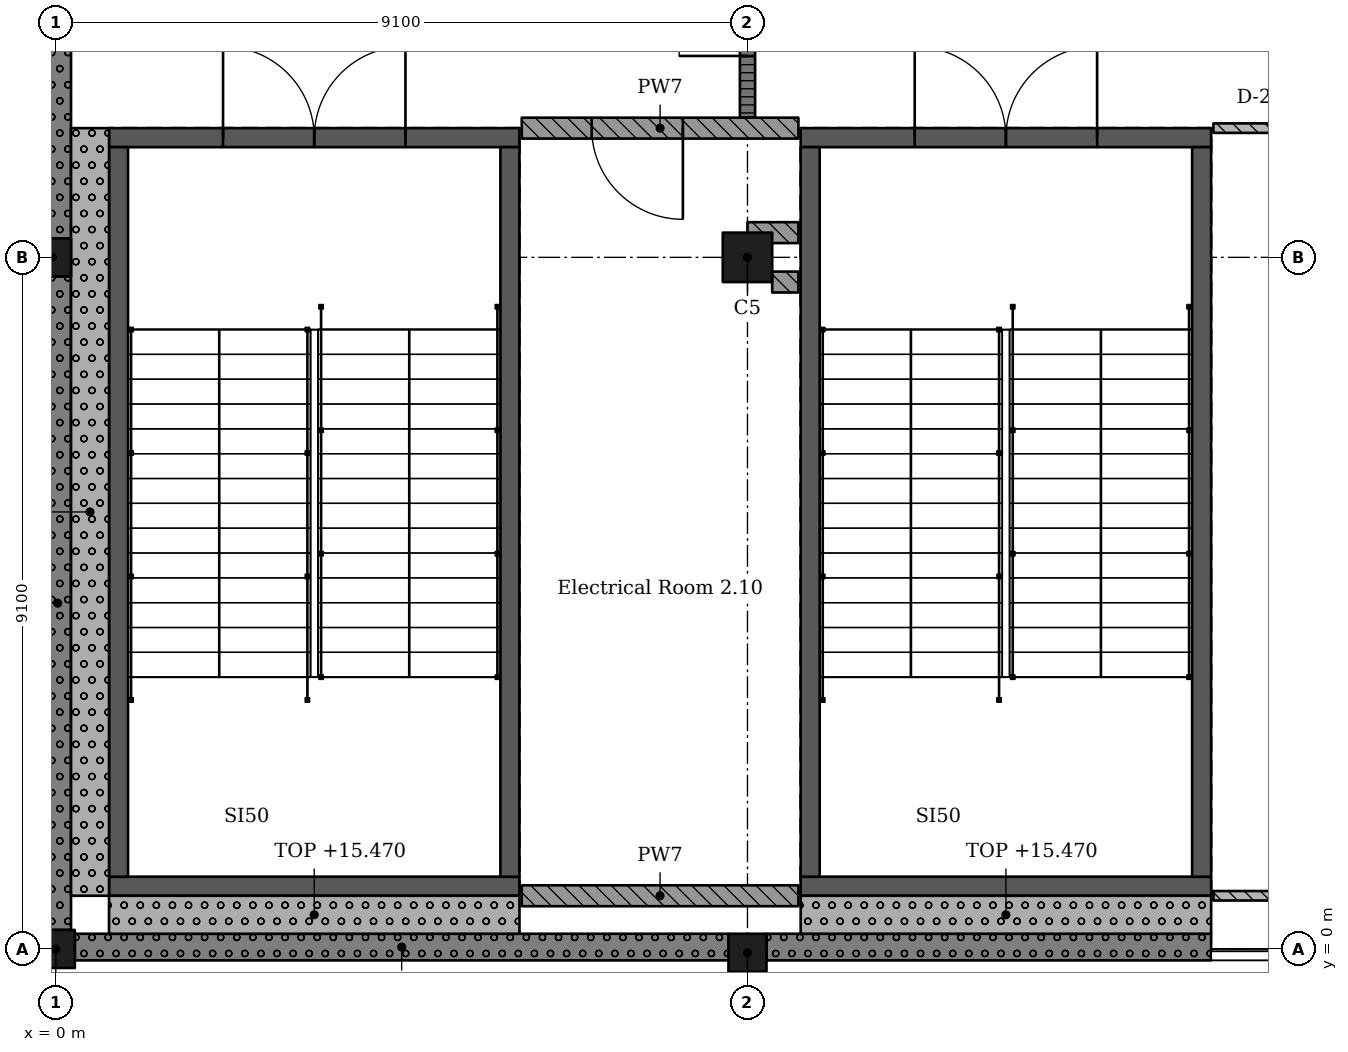
"""IFC4 building model, lengths in metres.
Left out: names, types, materials, properties, quantities, classifications, styles, units other than length and angle.
Written with IfcOpenShell. Run it as: python <this file> out.ifc"""

import sys

from ifc_helpers import new_model, si_unit, direction, frame, frame_2d, origin, origin_2d, place, context, subcontext, project, spatial, rectangle, extrude, element, fill, save


model = new_model("IFC4")
c1 = context("Model", 3, precision=1e-05, world=origin(), true_north=direction((0.0, 1.0)))
c2 = subcontext(c1, "Body", "Model", "MODEL_VIEW")
j1 = project(units=[si_unit("LENGTHUNIT", "METRE"), si_unit("PLANEANGLEUNIT", "RADIAN")], contexts=[c1])
p1 = place(None, origin())
s1 = spatial("IfcSite", under=j1, at=p1, CompositionType="ELEMENT")
p2 = place(p1, origin())
s2 = spatial("IfcBuilding", under=s1, at=p2, CompositionType="ELEMENT")
p3 = place(p2, frame((0.0, 0.0, 10.92)))
s3 = spatial("IfcBuildingStorey", under=s2, at=p3, CompositionType="ELEMENT", Elevation=10.92)
for number, where, z_axis, x_axis in (
    (1, (0.0, 0.0, 0.0), (0.0, 0.0, 1.0), (1.0, 0.0, 0.0)),
    (2, (-0.05, 9.1, 0.0), (0.0, 0.0, 1.0), (1.0, 0.0, 0.0)),
    (3, (9.1, -0.05, 0.0), (0.0, 0.0, 1.0), (1.0, 0.0, 0.0)),
):
    element("IfcColumn", number, at=place(p3, frame(where, z_axis=z_axis, x_axis=x_axis)), inside=s3, PredefinedType="COLUMN", context=c2, shape_type="SweptSolid", body=[
        extrude(rectangle(XDim=0.5, YDim=0.5, at=origin_2d()), origin(), (0.0, 0.0, 1.0), 4.55),
    ])
p4 = place(p3, frame((9.1, 9.1, 0.0), z_axis=(0.0, 0.0, 1.0), x_axis=(1.0, 0.0, 0.0)))
e4 = element("IfcColumn", 4, at=p4, inside=s3, PredefinedType="COLUMN", context=c2, shape_type="SweptSolid", body=[
    extrude(rectangle(XDim=0.65, YDim=0.65, at=origin_2d()), origin(), (0.0, 0.0, 1.0), 4.55),
])
p5 = place(p3, frame((6.1, 0.825, 0.0), z_axis=(0.0, 0.0, 1.0), x_axis=(-1.0, 0.0, 0.0)))
e5 = element("IfcWall", 5, at=p5, inside=s3, PredefinedType="SHEAR", context=c2, shape_type="SweptSolid", body=[
    extrude(rectangle(XDim=5.4, YDim=0.25, at=frame_2d((2.7, 0.0))), origin(), (0.0, 0.0, 1.0), 4.55),
])
p6 = place(p3, frame((6.1, 10.675, 0.0), z_axis=(0.0, 0.0, 1.0), x_axis=(-1.0, 0.0, 0.0)))
e6 = element("IfcWall", 6, at=p6, inside=s3, PredefinedType="SHEAR", context=c2, shape_type="SweptSolid", body=[
    extrude(rectangle(XDim=5.4, YDim=0.25, at=frame_2d((2.7, 0.0))), origin(), (0.0, 0.0, 1.0), 4.55),
])
p7 = place(p6, frame((1.5, 0.0, 0.0)))
e7 = element("IfcOpeningElement", 7, at=p7, cuts=e6, PredefinedType="OPENING", context=c2, shape_type="SweptSolid", body=[
    extrude(rectangle(XDim=2.4, YDim=2.1, at=frame_2d((1.2, 1.05))), frame((0.0, 0.135, 0.0), z_axis=(0.0, -1.0, 0.0), x_axis=(1.0, 0.0, 0.0)), (0.0, 0.0, 1.0), 0.27),
])
for number, where, z_axis, x_axis in (
    (8, (0.825, 10.55, 0.0), (0.0, 0.0, 1.0), (0.0, -1.0, 0.0)),
    (9, (5.975, 10.55, 0.0), (0.0, 0.0, 1.0), (0.0, -1.0, 0.0)),
):
    element("IfcWall", number, at=place(p3, frame(where, z_axis=z_axis, x_axis=x_axis)), inside=s3, PredefinedType="SHEAR", context=c2, shape_type="SweptSolid", body=[
        extrude(rectangle(XDim=9.6, YDim=0.25, at=frame_2d((4.8, 0.0))), origin(), (0.0, 0.0, 1.0), 4.55),
    ])
p8 = place(p3, frame((15.2, 0.825, 0.0), z_axis=(0.0, 0.0, 1.0), x_axis=(-1.0, 0.0, 0.0)))
e10 = element("IfcWall", 10, at=p8, inside=s3, PredefinedType="SHEAR", context=c2, shape_type="SweptSolid", body=[
    extrude(rectangle(XDim=5.4, YDim=0.25, at=frame_2d((2.7, 0.0))), origin(), (0.0, 0.0, 1.0), 4.55),
])
p9 = place(p3, frame((15.2, 10.675, 0.0), z_axis=(0.0, 0.0, 1.0), x_axis=(-1.0, 0.0, 0.0)))
e11 = element("IfcWall", 11, at=p9, inside=s3, PredefinedType="SHEAR", context=c2, shape_type="SweptSolid", body=[
    extrude(rectangle(XDim=5.4, YDim=0.25, at=frame_2d((2.7, 0.0))), origin(), (0.0, 0.0, 1.0), 4.55),
])
p10 = place(p9, frame((1.5, 0.0, 0.0)))
e12 = element("IfcOpeningElement", 12, at=p10, cuts=e11, PredefinedType="OPENING", context=c2, shape_type="SweptSolid", body=[
    extrude(rectangle(XDim=2.4, YDim=2.1, at=frame_2d((1.2, 1.05))), frame((0.0, 0.135, 0.0), z_axis=(0.0, -1.0, 0.0), x_axis=(1.0, 0.0, 0.0)), (0.0, 0.0, 1.0), 0.27),
])
for number, where, z_axis, x_axis in (
    (13, (9.925, 10.55, 0.0), (0.0, 0.0, 1.0), (0.0, -1.0, 0.0)),
    (14, (15.075, 10.55, 0.0), (0.0, 0.0, 1.0), (0.0, -1.0, 0.0)),
):
    element("IfcWall", number, at=place(p3, frame(where, z_axis=z_axis, x_axis=x_axis)), inside=s3, PredefinedType="SHEAR", context=c2, shape_type="SweptSolid", body=[
        extrude(rectangle(XDim=9.6, YDim=0.25, at=frame_2d((4.8, 0.0))), origin(), (0.0, 0.0, 1.0), 4.55),
    ])
p11 = place(p3, frame((0.25, 0.025, 0.0), z_axis=(0.0, 0.0, 1.0), x_axis=(1.0, 0.0, 0.0)))
e15 = element("IfcWall", 15, at=p11, inside=s3, PredefinedType="SOLIDWALL", context=c2, shape_type="SweptSolid", body=[
    extrude(rectangle(XDim=8.6, YDim=0.35, at=frame_2d((4.3, 0.0))), origin(), (0.0, 0.0, 1.0), 3.5),
])
p12 = place(p3, frame((9.35, 0.025, 0.0), z_axis=(0.0, 0.0, 1.0), x_axis=(1.0, 0.0, 0.0)))
e16 = element("IfcWall", 16, at=p12, inside=s3, PredefinedType="SOLIDWALL", context=c2, shape_type="SweptSolid", body=[
    extrude(rectangle(XDim=5.85, YDim=0.35, at=frame_2d((2.925, 0.0))), origin(), (0.0, 0.0, 1.0), 3.5),
])
p13 = place(p3, frame((0.025, 17.875, 0.0), z_axis=(0.0, 0.0, 1.0), x_axis=(0.0, -1.0, 0.0)))
e17 = element("IfcWall", 17, at=p13, inside=s3, PredefinedType="SOLIDWALL", context=c2, shape_type="SweptSolid", body=[
    extrude(rectangle(XDim=8.525, YDim=0.35, at=frame_2d((4.262, 0.0))), origin(), (0.0, 0.0, 1.0), 3.5),
])
p14 = place(p3, frame((0.025, 8.85, 0.0), z_axis=(0.0, 0.0, 1.0), x_axis=(0.0, -1.0, 0.0)))
e18 = element("IfcWall", 18, at=p14, inside=s3, PredefinedType="SOLIDWALL", context=c2, shape_type="SweptSolid", body=[
    extrude(rectangle(XDim=8.6, YDim=0.35, at=frame_2d((4.3, 0.0))), origin(), (0.0, 0.0, 1.0), 3.5),
])
p15 = place(p3, frame((0.7, 0.45, 0.0), z_axis=(0.0, 0.0, 1.0), x_axis=(1.0, 0.0, 0.0)))
e19 = element("IfcWall", 19, at=p15, inside=s3, PredefinedType="SOLIDWALL", context=c2, shape_type="SweptSolid", body=[
    extrude(rectangle(XDim=5.4, YDim=0.5, at=frame_2d((2.7, 0.0))), origin(), (0.0, 0.0, 1.0), 4.55),
])
p16 = place(p3, frame((0.45, 0.7, 0.0), z_axis=(0.0, 0.0, 1.0), x_axis=(0.0, 1.0, 0.0)))
e20 = element("IfcWall", 20, at=p16, inside=s3, PredefinedType="SOLIDWALL", context=c2, shape_type="SweptSolid", body=[
    extrude(rectangle(XDim=10.1, YDim=0.5, at=frame_2d((5.05, 0.0))), origin(), (0.0, 0.0, 1.0), 4.25),
])
p17 = place(p3, frame((9.8, 0.45, 0.0), z_axis=(0.0, 0.0, 1.0), x_axis=(1.0, 0.0, 0.0)))
e21 = element("IfcWall", 21, at=p17, inside=s3, PredefinedType="SOLIDWALL", context=c2, shape_type="SweptSolid", body=[
    extrude(rectangle(XDim=5.4, YDim=0.5, at=frame_2d((2.7, 0.0))), origin(), (0.0, 0.0, 1.0), 4.55),
])
p18 = place(p3, frame((9.1, 9.425, 0.0), z_axis=(0.0, 0.0, 1.0), x_axis=(1.0, 0.0, 0.0)))
e22 = element("IfcWall", 22, at=p18, inside=s3, PredefinedType="SOLIDWALL", context=c2, shape_type="SweptSolid", body=[
    extrude(rectangle(XDim=0.67, YDim=0.275, at=frame_2d((0.335, 0.0))), origin(), (0.0, 0.0, 1.0), 4.25),
])
p19 = place(p3, frame((6.13, 10.8, 0.0), z_axis=(0.0, 0.0, 1.0), x_axis=(1.0, 0.0, 0.0)))
e23 = element("IfcWall", 23, at=p19, inside=s3, PredefinedType="SOLIDWALL", context=c2, shape_type="SweptSolid", body=[
    extrude(rectangle(XDim=3.64, YDim=0.275, at=frame_2d((1.82, 0.0))), origin(), (0.0, 0.0, 1.0), 4.25),
])
p20 = place(p19, frame((0.92, 0.0, 0.0)))
e24 = element("IfcOpeningElement", 24, at=p20, cuts=e23, PredefinedType="OPENING", context=c2, shape_type="SweptSolid", body=[
    extrude(rectangle(XDim=1.2, YDim=2.4, at=frame_2d((0.6, 1.2))), frame((0.0, 0.147, 0.0), z_axis=(0.0, -1.0, 0.0), x_axis=(1.0, 0.0, 0.0)), (0.0, 0.0, 1.0), 0.295),
])
p21 = place(p3, frame((9.1, 17.8, 0.0), z_axis=(0.0, 0.0, 1.0), x_axis=(0.0, -1.0, 0.0)))
e25 = element("IfcWall", 25, at=p21, inside=s3, PredefinedType="PARTITIONING", context=c2, shape_type="SweptSolid", body=[
    extrude(rectangle(XDim=6.863, YDim=0.2, at=frame_2d((3.431, 0.0))), origin(), (0.0, 0.0, 1.0), 3.55),
])
p22 = place(p21, frame((0.85, 0.0, 0.0)))
e26 = element("IfcOpeningElement", 26, at=p22, cuts=e25, PredefinedType="OPENING", context=c2, shape_type="SweptSolid", body=[
    extrude(rectangle(XDim=1.8, YDim=2.4, at=frame_2d((0.9, 1.2))), frame((0.0, 0.11, 0.0), z_axis=(0.0, -1.0, 0.0), x_axis=(1.0, 0.0, 0.0)), (0.0, 0.0, 1.0), 0.22),
])
p23 = place(p21, frame((4.25, 0.0, 0.0)))
e27 = element("IfcOpeningElement", 27, at=p23, cuts=e25, PredefinedType="OPENING", context=c2, shape_type="SweptSolid", body=[
    extrude(rectangle(XDim=1.8, YDim=2.4, at=frame_2d((0.9, 1.2))), frame((0.0, 0.11, 0.0), z_axis=(0.0, -1.0, 0.0), x_axis=(1.0, 0.0, 0.0)), (0.0, 0.0, 1.0), 0.22),
])
p24 = place(p3, frame((9.425, 8.775, 0.0), z_axis=(0.0, 0.0, 1.0), x_axis=(1.0, 0.0, 0.0)))
e28 = element("IfcWall", 28, at=p24, inside=s3, PredefinedType="SOLIDWALL", context=c2, shape_type="SweptSolid", body=[
    extrude(rectangle(XDim=0.345, YDim=0.275, at=frame_2d((0.172, 0.0))), origin(), (0.0, 0.0, 1.0), 4.25),
])
p25 = place(p3, frame((9.77, 0.7, 0.0), z_axis=(0.0, 0.0, 1.0), x_axis=(-1.0, 0.0, 0.0)))
e29 = element("IfcWall", 29, at=p25, inside=s3, PredefinedType="SOLIDWALL", context=c2, shape_type="SweptSolid", body=[
    extrude(rectangle(XDim=3.64, YDim=0.275, at=frame_2d((1.82, 0.0))), origin(), (0.0, 0.0, 1.0), 4.25),
])
p26 = place(p3, frame((15.23, 10.8, 0.0), z_axis=(0.0, 0.0, 1.0), x_axis=(1.0, 0.0, 0.0)))
e30 = element("IfcWall", 30, at=p26, inside=s3, PredefinedType="PARTITIONING", context=c2, shape_type="SweptSolid", body=[
    extrude(rectangle(XDim=3.64, YDim=0.125, at=frame_2d((1.82, 0.0))), origin(), (0.0, 0.0, 1.0), 4.25),
])
p27 = place(p26, frame((1.02, 0.0, 0.0)))
e31 = element("IfcOpeningElement", 31, at=p27, cuts=e30, PredefinedType="OPENING", context=c2, shape_type="SweptSolid", body=[
    extrude(rectangle(XDim=0.9, YDim=2.1, at=frame_2d((0.45, 1.05))), frame((0.0, 0.073, 0.0), z_axis=(0.0, -1.0, 0.0), x_axis=(1.0, 0.0, 0.0)), (0.0, 0.0, 1.0), 0.145),
])
p28 = place(p3, frame((18.87, 0.7, 0.0), z_axis=(0.0, 0.0, 1.0), x_axis=(-1.0, 0.0, 0.0)))
e32 = element("IfcWall", 32, at=p28, inside=s3, PredefinedType="PARTITIONING", context=c2, shape_type="SweptSolid", body=[
    extrude(rectangle(XDim=3.64, YDim=0.125, at=frame_2d((1.82, 0.0))), origin(), (0.0, 0.0, 1.0), 4.25),
])
p29 = place(p20, origin())
e33 = element("IfcDoor", 33, at=p29, inside=s3, OperationType="SINGLE_SWING_RIGHT", PredefinedType="DOOR", context=c2, shape_type="SweptSolid", body=[
    extrude(rectangle(XDim=1.2, YDim=2.4, at=frame_2d((0.6, 1.2))), frame((0.0, 0.025, 0.0), z_axis=(0.0, -1.0, 0.0), x_axis=(1.0, 0.0, 0.0)), (0.0, 0.0, 1.0), 0.05),
])
fill(e24, e33)
p30 = place(p23, origin())
e34 = element("IfcDoor", 34, at=p30, inside=s3, OperationType="DOUBLE_DOOR_SINGLE_SWING", PredefinedType="DOOR", context=c2, shape_type="SweptSolid", body=[
    extrude(rectangle(XDim=1.8, YDim=2.4, at=frame_2d((0.9, 1.2))), frame((0.0, 0.025, 0.0), z_axis=(0.0, -1.0, 0.0), x_axis=(1.0, 0.0, 0.0)), (0.0, 0.0, 1.0), 0.05),
])
fill(e27, e34)
p31 = place(p7, origin())
e35 = element("IfcDoor", 35, at=p31, inside=s3, OperationType="DOUBLE_DOOR_SINGLE_SWING", PredefinedType="DOOR", context=c2, shape_type="SweptSolid", body=[
    extrude(rectangle(XDim=2.4, YDim=2.1, at=frame_2d((1.2, 1.05))), frame((0.0, 0.025, 0.0), z_axis=(0.0, -1.0, 0.0), x_axis=(1.0, 0.0, 0.0)), (0.0, 0.0, 1.0), 0.05),
])
fill(e7, e35)
p32 = place(p10, origin())
e36 = element("IfcDoor", 36, at=p32, inside=s3, OperationType="DOUBLE_DOOR_SINGLE_SWING", PredefinedType="DOOR", context=c2, shape_type="SweptSolid", body=[
    extrude(rectangle(XDim=2.4, YDim=2.1, at=frame_2d((1.2, 1.05))), frame((0.0, 0.025, 0.0), z_axis=(0.0, -1.0, 0.0), x_axis=(1.0, 0.0, 0.0)), (0.0, 0.0, 1.0), 0.05),
])
fill(e12, e36)
save(model, sys.argv[1])
